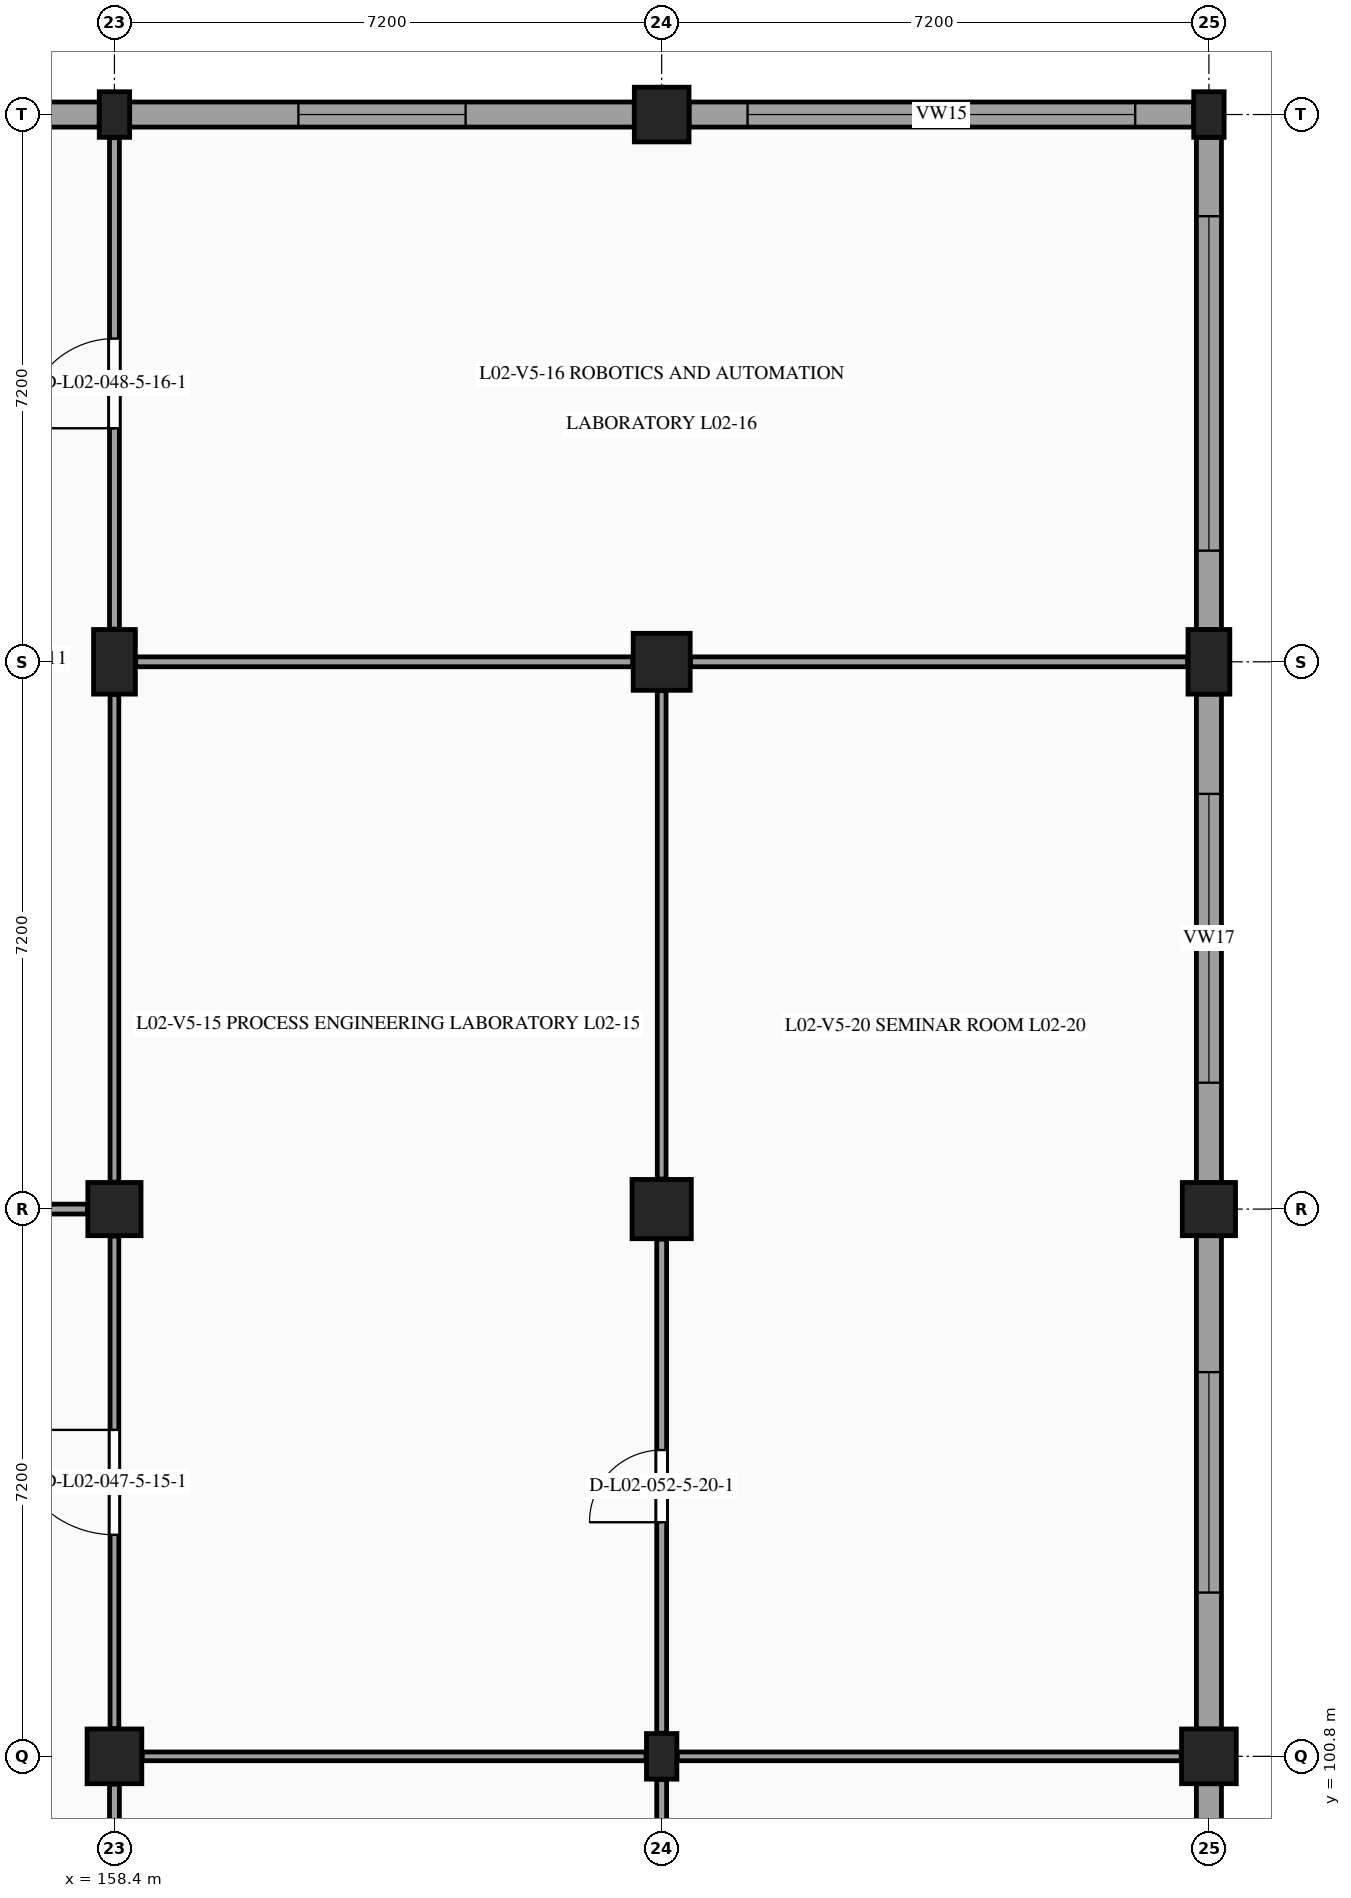
"""IFC4 building model, lengths in metres.
Left out: names, types, materials, properties, quantities, classifications, styles, units other than length and angle.
Written with IfcOpenShell. Run it as: python <this file> out.ifc"""

import sys

from ifc_helpers import new_model, si_unit, direction, frame, frame_2d, origin, origin_2d, place, context, subcontext, project, spatial, rectangle, extrude, element, fill, save


model = new_model("IFC4")
c1 = context("Model", 3, precision=1e-05, world=origin(), true_north=direction((0.0, 1.0)))
c2 = subcontext(c1, "Body", "Model", "MODEL_VIEW")
j1 = project(units=[si_unit("LENGTHUNIT", "METRE"), si_unit("PLANEANGLEUNIT", "RADIAN")], contexts=[c1])
p1 = place(None, origin())
s1 = spatial("IfcSite", under=j1, at=p1, CompositionType="ELEMENT")
p2 = place(p1, origin())
s2 = spatial("IfcBuilding", under=s1, at=p2, CompositionType="ELEMENT")
p3 = place(p2, frame((0.0, 0.0, 9.9)))
s3 = spatial("IfcBuildingStorey", under=s2, at=p3, CompositionType="ELEMENT", Elevation=9.9)
p4 = place(p3, frame((158.4, 100.8, 0.0), z_axis=(0.0, 0.0, 1.0), x_axis=(1.0, 0.0, 0.0)))
e1 = element("IfcColumn", 1, at=p4, inside=s3, PredefinedType="COLUMN", context=c2, shape_type="SweptSolid", body=[
    extrude(rectangle(XDim=0.72, YDim=0.72, at=origin_2d()), origin(), (0.0, 0.0, 1.0), 4.5),
])
p5 = place(p3, frame((158.4, 108.0, 0.0), z_axis=(0.0, 0.0, 1.0), x_axis=(1.0, 0.0, 0.0)))
e2 = element("IfcColumn", 2, at=p5, inside=s3, PredefinedType="COLUMN", context=c2, shape_type="SweptSolid", body=[
    extrude(rectangle(XDim=0.7, YDim=0.7, at=origin_2d()), origin(), (0.0, 0.0, 1.0), 4.5),
])
p6 = place(p3, frame((158.4, 115.2, 0.0), z_axis=(0.0, 0.0, 1.0), x_axis=(1.0, 0.0, 0.0)))
e3 = element("IfcColumn", 3, at=p6, inside=s3, PredefinedType="COLUMN", context=c2, shape_type="SweptSolid", body=[
    extrude(rectangle(XDim=0.55, YDim=0.85, at=origin_2d()), origin(), (0.0, 0.0, 1.0), 4.5),
])
for number, where, z_axis, x_axis in (
    (4, (158.4, 122.4, 0.0), (0.0, 0.0, 1.0), (1.0, 0.0, 0.0)),
    (5, (165.6, 100.8, 0.0), (0.0, 0.0, 1.0), (1.0, 0.0, 0.0)),
):
    element("IfcColumn", number, at=place(p3, frame(where, z_axis=z_axis, x_axis=x_axis)), inside=s3, PredefinedType="PILASTER", context=c2, shape_type="SweptSolid", body=[
        extrude(rectangle(XDim=0.4, YDim=0.6, at=origin_2d()), origin(), (0.0, 0.0, 1.0), 4.5),
    ])
p7 = place(p3, frame((165.6, 108.0, 0.0), z_axis=(0.0, 0.0, 1.0), x_axis=(1.0, 0.0, 0.0)))
e6 = element("IfcColumn", 6, at=p7, inside=s3, PredefinedType="COLUMN", context=c2, shape_type="SweptSolid", body=[
    extrude(rectangle(XDim=0.78, YDim=0.78, at=origin_2d()), origin(), (0.0, 0.0, 1.0), 4.5),
])
p8 = place(p3, frame((165.6, 115.2, 0.0), z_axis=(0.0, 0.0, 1.0), x_axis=(1.0, 0.0, 0.0)))
e7 = element("IfcColumn", 7, at=p8, inside=s3, PredefinedType="COLUMN", context=c2, shape_type="SweptSolid", body=[
    extrude(rectangle(XDim=0.75, YDim=0.75, at=origin_2d()), origin(), (0.0, 0.0, 1.0), 4.5),
])
for number, where, z_axis, x_axis in (
    (8, (165.6, 122.4, 0.0), (0.0, 0.0, 1.0), (1.0, 0.0, 0.0)),
    (9, (172.8, 100.8, 0.0), (0.0, 0.0, 1.0), (1.0, 0.0, 0.0)),
):
    element("IfcColumn", number, at=place(p3, frame(where, z_axis=z_axis, x_axis=x_axis)), inside=s3, PredefinedType="COLUMN", context=c2, shape_type="SweptSolid", body=[
        extrude(rectangle(XDim=0.72, YDim=0.72, at=origin_2d()), origin(), (0.0, 0.0, 1.0), 4.5),
    ])
p9 = place(p3, frame((172.8, 108.0, 0.0), z_axis=(0.0, 0.0, 1.0), x_axis=(1.0, 0.0, 0.0)))
e10 = element("IfcColumn", 10, at=p9, inside=s3, PredefinedType="COLUMN", context=c2, shape_type="SweptSolid", body=[
    extrude(rectangle(XDim=0.7, YDim=0.7, at=origin_2d()), origin(), (0.0, 0.0, 1.0), 4.5),
])
p10 = place(p3, frame((172.8, 115.2, 0.0), z_axis=(0.0, 0.0, 1.0), x_axis=(1.0, 0.0, 0.0)))
e11 = element("IfcColumn", 11, at=p10, inside=s3, PredefinedType="COLUMN", context=c2, shape_type="SweptSolid", body=[
    extrude(rectangle(XDim=0.55, YDim=0.85, at=origin_2d()), origin(), (0.0, 0.0, 1.0), 4.5),
])
p11 = place(p3, frame((172.8, 122.4, 0.0), z_axis=(0.0, 0.0, 1.0), x_axis=(1.0, 0.0, 0.0)))
e12 = element("IfcColumn", 12, at=p11, inside=s3, PredefinedType="PILASTER", context=c2, shape_type="SweptSolid", body=[
    extrude(rectangle(XDim=0.4, YDim=0.6, at=origin_2d()), origin(), (0.0, 0.0, 1.0), 4.5),
])
p12 = place(p3, frame((151.56, 122.4, 0.0), z_axis=(0.0, 0.0, 1.0), x_axis=(1.0, 0.0, 0.0)))
e13 = element("IfcWall", 13, at=p12, inside=s3, PredefinedType="STANDARD", context=c2, shape_type="SweptSolid", body=[
    extrude(rectangle(XDim=6.64, YDim=0.33, at=frame_2d((3.32, 0.0))), origin(), (0.0, 0.0, 1.0), 3.47),
])
p13 = place(p12, frame((2.02, 0.0, 0.98)))
e14 = element("IfcOpeningElement", 14, at=p13, cuts=e13, PredefinedType="OPENING", context=c2, shape_type="SweptSolid", body=[
    extrude(rectangle(XDim=2.6, YDim=1.5, at=frame_2d((1.3, 0.75))), frame((0.0, 0.175, 0.0), z_axis=(0.0, -1.0, 0.0), x_axis=(1.0, 0.0, 0.0)), (0.0, 0.0, 1.0), 0.35),
])
p14 = place(p3, frame((158.6, 122.4, 0.0), z_axis=(0.0, 0.0, 1.0), x_axis=(1.0, 0.0, 0.0)))
e15 = element("IfcWall", 15, at=p14, inside=s3, PredefinedType="STANDARD", context=c2, shape_type="SweptSolid", body=[
    extrude(rectangle(XDim=6.64, YDim=0.33, at=frame_2d((3.32, 0.0))), origin(), (0.0, 0.0, 1.0), 3.47),
])
p15 = place(p14, frame((2.22, 0.0, 0.98)))
e16 = element("IfcOpeningElement", 16, at=p15, cuts=e15, PredefinedType="OPENING", context=c2, shape_type="SweptSolid", body=[
    extrude(rectangle(XDim=2.2, YDim=1.45, at=frame_2d((1.1, 0.725))), frame((0.0, 0.175, 0.0), z_axis=(0.0, -1.0, 0.0), x_axis=(1.0, 0.0, 0.0)), (0.0, 0.0, 1.0), 0.35),
])
p16 = place(p3, frame((165.96, 122.4, 0.0), z_axis=(0.0, 0.0, 1.0), x_axis=(1.0, 0.0, 0.0)))
e17 = element("IfcWall", 17, at=p16, inside=s3, PredefinedType="STANDARD", context=c2, shape_type="SweptSolid", body=[
    extrude(rectangle(XDim=6.64, YDim=0.33, at=frame_2d((3.32, 0.0))), origin(), (0.0, 0.0, 1.0), 3.47),
])
p17 = place(p16, frame((0.77, 0.0, 0.98)))
e18 = element("IfcOpeningElement", 18, at=p17, cuts=e17, PredefinedType="OPENING", context=c2, shape_type="SweptSolid", body=[
    extrude(rectangle(XDim=5.1, YDim=1.75, at=frame_2d((2.55, 0.875))), frame((0.0, 0.175, 0.0), z_axis=(0.0, -1.0, 0.0), x_axis=(1.0, 0.0, 0.0)), (0.0, 0.0, 1.0), 0.35),
])
p18 = place(p3, frame((172.8, 122.1, 0.0), z_axis=(0.0, 0.0, 1.0), x_axis=(0.0, -1.0, 0.0)))
e19 = element("IfcWall", 19, at=p18, inside=s3, PredefinedType="STANDARD", context=c2, shape_type="SweptSolid", body=[
    extrude(rectangle(XDim=6.475, YDim=0.33, at=frame_2d((3.238, 0.0))), origin(), (0.0, 0.0, 1.0), 3.47),
])
p19 = place(p18, frame((1.038, 0.0, 0.98)))
e20 = element("IfcOpeningElement", 20, at=p19, cuts=e19, PredefinedType="OPENING", context=c2, shape_type="SweptSolid", body=[
    extrude(rectangle(XDim=4.4, YDim=1.65, at=frame_2d((2.2, 0.825))), frame((0.0, 0.175, 0.0), z_axis=(0.0, -1.0, 0.0), x_axis=(1.0, 0.0, 0.0)), (0.0, 0.0, 1.0), 0.35),
])
p20 = place(p3, frame((172.8, 114.775, 0.0), z_axis=(0.0, 0.0, 1.0), x_axis=(0.0, -1.0, 0.0)))
e21 = element("IfcWall", 21, at=p20, inside=s3, PredefinedType="STANDARD", context=c2, shape_type="SweptSolid", body=[
    extrude(rectangle(XDim=6.425, YDim=0.33, at=frame_2d((3.212, 0.0))), origin(), (0.0, 0.0, 1.0), 3.47),
])
p21 = place(p20, frame((1.312, 0.0, 0.98)))
e22 = element("IfcOpeningElement", 22, at=p21, cuts=e21, PredefinedType="OPENING", context=c2, shape_type="SweptSolid", body=[
    extrude(rectangle(XDim=3.8, YDim=1.6, at=frame_2d((1.9, 0.8))), frame((0.0, 0.175, 0.0), z_axis=(0.0, -1.0, 0.0), x_axis=(1.0, 0.0, 0.0)), (0.0, 0.0, 1.0), 0.35),
])
p22 = place(p3, frame((172.8, 107.65, 0.0), z_axis=(0.0, 0.0, 1.0), x_axis=(0.0, -1.0, 0.0)))
e23 = element("IfcWall", 23, at=p22, inside=s3, PredefinedType="STANDARD", context=c2, shape_type="SweptSolid", body=[
    extrude(rectangle(XDim=6.49, YDim=0.33, at=frame_2d((3.245, 0.0))), origin(), (0.0, 0.0, 1.0), 3.47),
])
p23 = place(p22, frame((1.795, 0.0, 0.98)))
e24 = element("IfcOpeningElement", 24, at=p23, cuts=e23, PredefinedType="OPENING", context=c2, shape_type="SweptSolid", body=[
    extrude(rectangle(XDim=2.9, YDim=1.6, at=frame_2d((1.45, 0.8))), frame((0.0, 0.175, 0.0), z_axis=(0.0, -1.0, 0.0), x_axis=(1.0, 0.0, 0.0)), (0.0, 0.0, 1.0), 0.35),
])
p24 = place(p3, frame((172.8, 100.44, 0.0), z_axis=(0.0, 0.0, 1.0), x_axis=(0.0, -1.0, 0.0)))
e25 = element("IfcWall", 25, at=p24, inside=s3, PredefinedType="STANDARD", context=c2, shape_type="SweptSolid", body=[
    extrude(rectangle(XDim=6.465, YDim=0.33, at=frame_2d((3.232, 0.0))), origin(), (0.0, 0.0, 1.0), 3.47),
])
p25 = place(p24, frame((1.982, 0.0, 0.98)))
e26 = element("IfcOpeningElement", 26, at=p25, cuts=e25, PredefinedType="OPENING", context=c2, shape_type="SweptSolid", body=[
    extrude(rectangle(XDim=2.5, YDim=1.35, at=frame_2d((1.25, 0.675))), frame((0.0, 0.175, 0.0), z_axis=(0.0, -1.0, 0.0), x_axis=(1.0, 0.0, 0.0)), (0.0, 0.0, 1.0), 0.35),
])
p26 = place(p3, frame((158.4, 93.98, 0.0), z_axis=(0.0, 0.0, 1.0), x_axis=(0.0, 1.0, 0.0)))
e27 = element("IfcWall", 27, at=p26, inside=s3, PredefinedType="PARTITIONING", context=c2, shape_type="SweptSolid", body=[
    extrude(rectangle(XDim=6.455, YDim=0.13, at=frame_2d((3.228, 0.0))), origin(), (0.0, 0.0, 1.0), 3.54),
])
p27 = place(p3, frame((158.4, 101.165, 0.0), z_axis=(0.0, 0.0, 1.0), x_axis=(0.0, 1.0, 0.0)))
e28 = element("IfcWall", 28, at=p27, inside=s3, PredefinedType="PARTITIONING", context=c2, shape_type="SweptSolid", body=[
    extrude(rectangle(XDim=6.48, YDim=0.115, at=frame_2d((3.24, 0.0))), origin(), (0.0, 0.0, 1.0), 3.54),
])
p28 = place(p27, frame((2.55, 0.0, 0.0)))
e29 = element("IfcOpeningElement", 29, at=p28, cuts=e28, PredefinedType="OPENING", context=c2, shape_type="SweptSolid", body=[
    extrude(rectangle(XDim=1.38, YDim=2.22, at=frame_2d((0.69, 1.11))), frame((0.0, 0.067, 0.0), z_axis=(0.0, -1.0, 0.0), x_axis=(1.0, 0.0, 0.0)), (0.0, 0.0, 1.0), 0.135),
])
p29 = place(p3, frame((151.595, 108.0, 0.0), z_axis=(0.0, 0.0, 1.0), x_axis=(1.0, 0.0, 0.0)))
e30 = element("IfcWall", 30, at=p29, inside=s3, PredefinedType="PARTITIONING", context=c2, shape_type="SweptSolid", body=[
    extrude(rectangle(XDim=6.45, YDim=0.13, at=frame_2d((3.225, 0.0))), origin(), (0.0, 0.0, 1.0), 3.5),
])
p30 = place(p3, frame((158.4, 108.355, 0.0), z_axis=(0.0, 0.0, 1.0), x_axis=(0.0, 1.0, 0.0)))
e31 = element("IfcWall", 31, at=p30, inside=s3, PredefinedType="PARTITIONING", context=c2, shape_type="SweptSolid", body=[
    extrude(rectangle(XDim=6.415, YDim=0.115, at=frame_2d((3.208, 0.0))), origin(), (0.0, 0.0, 1.0), 3.535),
])
p31 = place(p3, frame((158.4, 115.63, 0.0), z_axis=(0.0, 0.0, 1.0), x_axis=(0.0, 1.0, 0.0)))
e32 = element("IfcWall", 32, at=p31, inside=s3, PredefinedType="PARTITIONING", context=c2, shape_type="SweptSolid", body=[
    extrude(rectangle(XDim=6.465, YDim=0.13, at=frame_2d((3.232, 0.0))), origin(), (0.0, 0.0, 1.0), 3.53),
])
p32 = place(p31, frame((2.643, 0.0, 0.0)))
e33 = element("IfcOpeningElement", 33, at=p32, cuts=e32, PredefinedType="OPENING", context=c2, shape_type="SweptSolid", body=[
    extrude(rectangle(XDim=1.18, YDim=2.18, at=frame_2d((0.59, 1.09))), frame((0.0, 0.075, 0.0), z_axis=(0.0, -1.0, 0.0), x_axis=(1.0, 0.0, 0.0)), (0.0, 0.0, 1.0), 0.15),
])
p33 = place(p3, frame((165.6, 94.03, 0.0), z_axis=(0.0, 0.0, 1.0), x_axis=(0.0, 1.0, 0.0)))
e34 = element("IfcWall", 34, at=p33, inside=s3, PredefinedType="PARTITIONING", context=c2, shape_type="SweptSolid", body=[
    extrude(rectangle(XDim=6.465, YDim=0.13, at=frame_2d((3.232, 0.0))), origin(), (0.0, 0.0, 1.0), 3.54),
])
p34 = place(p3, frame((158.765, 100.8, 0.0), z_axis=(0.0, 0.0, 1.0), x_axis=(1.0, 0.0, 0.0)))
e35 = element("IfcWall", 35, at=p34, inside=s3, PredefinedType="PARTITIONING", context=c2, shape_type="SweptSolid", body=[
    extrude(rectangle(XDim=6.63, YDim=0.115, at=frame_2d((3.315, 0.0))), origin(), (0.0, 0.0, 1.0), 3.505),
])
p35 = place(p3, frame((165.6, 101.105, 0.0), z_axis=(0.0, 0.0, 1.0), x_axis=(0.0, 1.0, 0.0)))
e36 = element("IfcWall", 36, at=p35, inside=s3, PredefinedType="PARTITIONING", context=c2, shape_type="SweptSolid", body=[
    extrude(rectangle(XDim=6.5, YDim=0.13, at=frame_2d((3.25, 0.0))), origin(), (0.0, 0.0, 1.0), 3.54),
])
p36 = place(p35, frame((2.775, 0.0, 0.0)))
e37 = element("IfcOpeningElement", 37, at=p36, cuts=e36, PredefinedType="OPENING", context=c2, shape_type="SweptSolid", body=[
    extrude(rectangle(XDim=0.95, YDim=2.15, at=frame_2d((0.475, 1.075))), frame((0.0, 0.075, 0.0), z_axis=(0.0, -1.0, 0.0), x_axis=(1.0, 0.0, 0.0)), (0.0, 0.0, 1.0), 0.15),
])
p37 = place(p3, frame((165.6, 108.395, 0.0), z_axis=(0.0, 0.0, 1.0), x_axis=(0.0, 1.0, 0.0)))
e38 = element("IfcWall", 38, at=p37, inside=s3, PredefinedType="PARTITIONING", context=c2, shape_type="SweptSolid", body=[
    extrude(rectangle(XDim=6.425, YDim=0.115, at=frame_2d((3.212, 0.0))), origin(), (0.0, 0.0, 1.0), 3.535),
])
p38 = place(p3, frame((158.68, 115.2, 0.0), z_axis=(0.0, 0.0, 1.0), x_axis=(1.0, 0.0, 0.0)))
e39 = element("IfcWall", 39, at=p38, inside=s3, PredefinedType="PARTITIONING", context=c2, shape_type="SweptSolid", body=[
    extrude(rectangle(XDim=6.54, YDim=0.13, at=frame_2d((3.27, 0.0))), origin(), (0.0, 0.0, 1.0), 3.505),
])
p39 = place(p3, frame((165.805, 100.8, 0.0), z_axis=(0.0, 0.0, 1.0), x_axis=(1.0, 0.0, 0.0)))
e40 = element("IfcWall", 40, at=p39, inside=s3, PredefinedType="PARTITIONING", context=c2, shape_type="SweptSolid", body=[
    extrude(rectangle(XDim=6.63, YDim=0.115, at=frame_2d((3.315, 0.0))), origin(), (0.0, 0.0, 1.0), 3.525),
])
p40 = place(p3, frame((165.98, 115.2, 0.0), z_axis=(0.0, 0.0, 1.0), x_axis=(1.0, 0.0, 0.0)))
e41 = element("IfcWall", 41, at=p40, inside=s3, PredefinedType="PARTITIONING", context=c2, shape_type="SweptSolid", body=[
    extrude(rectangle(XDim=6.54, YDim=0.13, at=frame_2d((3.27, 0.0))), origin(), (0.0, 0.0, 1.0), 3.525),
])
p41 = place(p15, origin())
e42 = element("IfcWindow", 42, at=p41, inside=s3, PartitioningType="SINGLE_PANEL", PredefinedType="WINDOW", context=c2, shape_type="SweptSolid", body=[
    extrude(rectangle(XDim=2.2, YDim=1.45, at=frame_2d((1.1, 0.725))), frame((0.0, -0.03, 0.0), z_axis=(0.0, -1.0, 0.0), x_axis=(1.0, 0.0, 0.0)), (0.0, 0.0, 1.0), 0.06),
])
fill(e16, e42)
p42 = place(p17, origin())
e43 = element("IfcWindow", 43, at=p42, inside=s3, PartitioningType="SINGLE_PANEL", PredefinedType="WINDOW", context=c2, shape_type="SweptSolid", body=[
    extrude(rectangle(XDim=5.1, YDim=1.75, at=frame_2d((2.55, 0.875))), frame((0.0, -0.03, 0.0), z_axis=(0.0, -1.0, 0.0), x_axis=(1.0, 0.0, 0.0)), (0.0, 0.0, 1.0), 0.06),
])
fill(e18, e43)
p43 = place(p19, origin())
e44 = element("IfcWindow", 44, at=p43, inside=s3, PartitioningType="SINGLE_PANEL", PredefinedType="WINDOW", context=c2, shape_type="SweptSolid", body=[
    extrude(rectangle(XDim=4.4, YDim=1.65, at=frame_2d((2.2, 0.825))), frame((0.0, -0.03, 0.0), z_axis=(0.0, -1.0, 0.0), x_axis=(1.0, 0.0, 0.0)), (0.0, 0.0, 1.0), 0.06),
])
fill(e20, e44)
p44 = place(p21, origin())
e45 = element("IfcWindow", 45, at=p44, inside=s3, PartitioningType="SINGLE_PANEL", PredefinedType="WINDOW", context=c2, shape_type="SweptSolid", body=[
    extrude(rectangle(XDim=3.8, YDim=1.6, at=frame_2d((1.9, 0.8))), frame((0.0, -0.03, 0.0), z_axis=(0.0, -1.0, 0.0), x_axis=(1.0, 0.0, 0.0)), (0.0, 0.0, 1.0), 0.06),
])
fill(e22, e45)
p45 = place(p23, origin())
e46 = element("IfcWindow", 46, at=p45, inside=s3, PartitioningType="SINGLE_PANEL", PredefinedType="WINDOW", context=c2, shape_type="SweptSolid", body=[
    extrude(rectangle(XDim=2.9, YDim=1.6, at=frame_2d((1.45, 0.8))), frame((0.0, -0.03, 0.0), z_axis=(0.0, -1.0, 0.0), x_axis=(1.0, 0.0, 0.0)), (0.0, 0.0, 1.0), 0.06),
])
fill(e24, e46)
p46 = place(p28, origin())
e47 = element("IfcDoor", 47, at=p46, inside=s3, OperationType="SINGLE_SWING_RIGHT", PredefinedType="DOOR", context=c2, shape_type="SweptSolid", body=[
    extrude(rectangle(XDim=1.38, YDim=2.22, at=frame_2d((0.69, 1.11))), frame((0.0, 0.025, 0.0), z_axis=(0.0, -1.0, 0.0), x_axis=(1.0, 0.0, 0.0)), (0.0, 0.0, 1.0), 0.05),
])
fill(e29, e47)
p47 = place(p32, origin())
e48 = element("IfcDoor", 48, at=p47, inside=s3, OperationType="SINGLE_SWING_LEFT", PredefinedType="DOOR", context=c2, shape_type="SweptSolid", body=[
    extrude(rectangle(XDim=1.18, YDim=2.18, at=frame_2d((0.59, 1.09))), frame((0.0, 0.025, 0.0), z_axis=(0.0, -1.0, 0.0), x_axis=(1.0, 0.0, 0.0)), (0.0, 0.0, 1.0), 0.05),
])
fill(e33, e48)
p48 = place(p36, origin())
e49 = element("IfcDoor", 49, at=p48, inside=s3, OperationType="SINGLE_SWING_LEFT", PredefinedType="DOOR", context=c2, shape_type="SweptSolid", body=[
    extrude(rectangle(XDim=0.95, YDim=2.15, at=frame_2d((0.475, 1.075))), frame((0.0, 0.025, 0.0), z_axis=(0.0, -1.0, 0.0), x_axis=(1.0, 0.0, 0.0)), (0.0, 0.0, 1.0), 0.05),
])
fill(e37, e49)
save(model, sys.argv[1])
